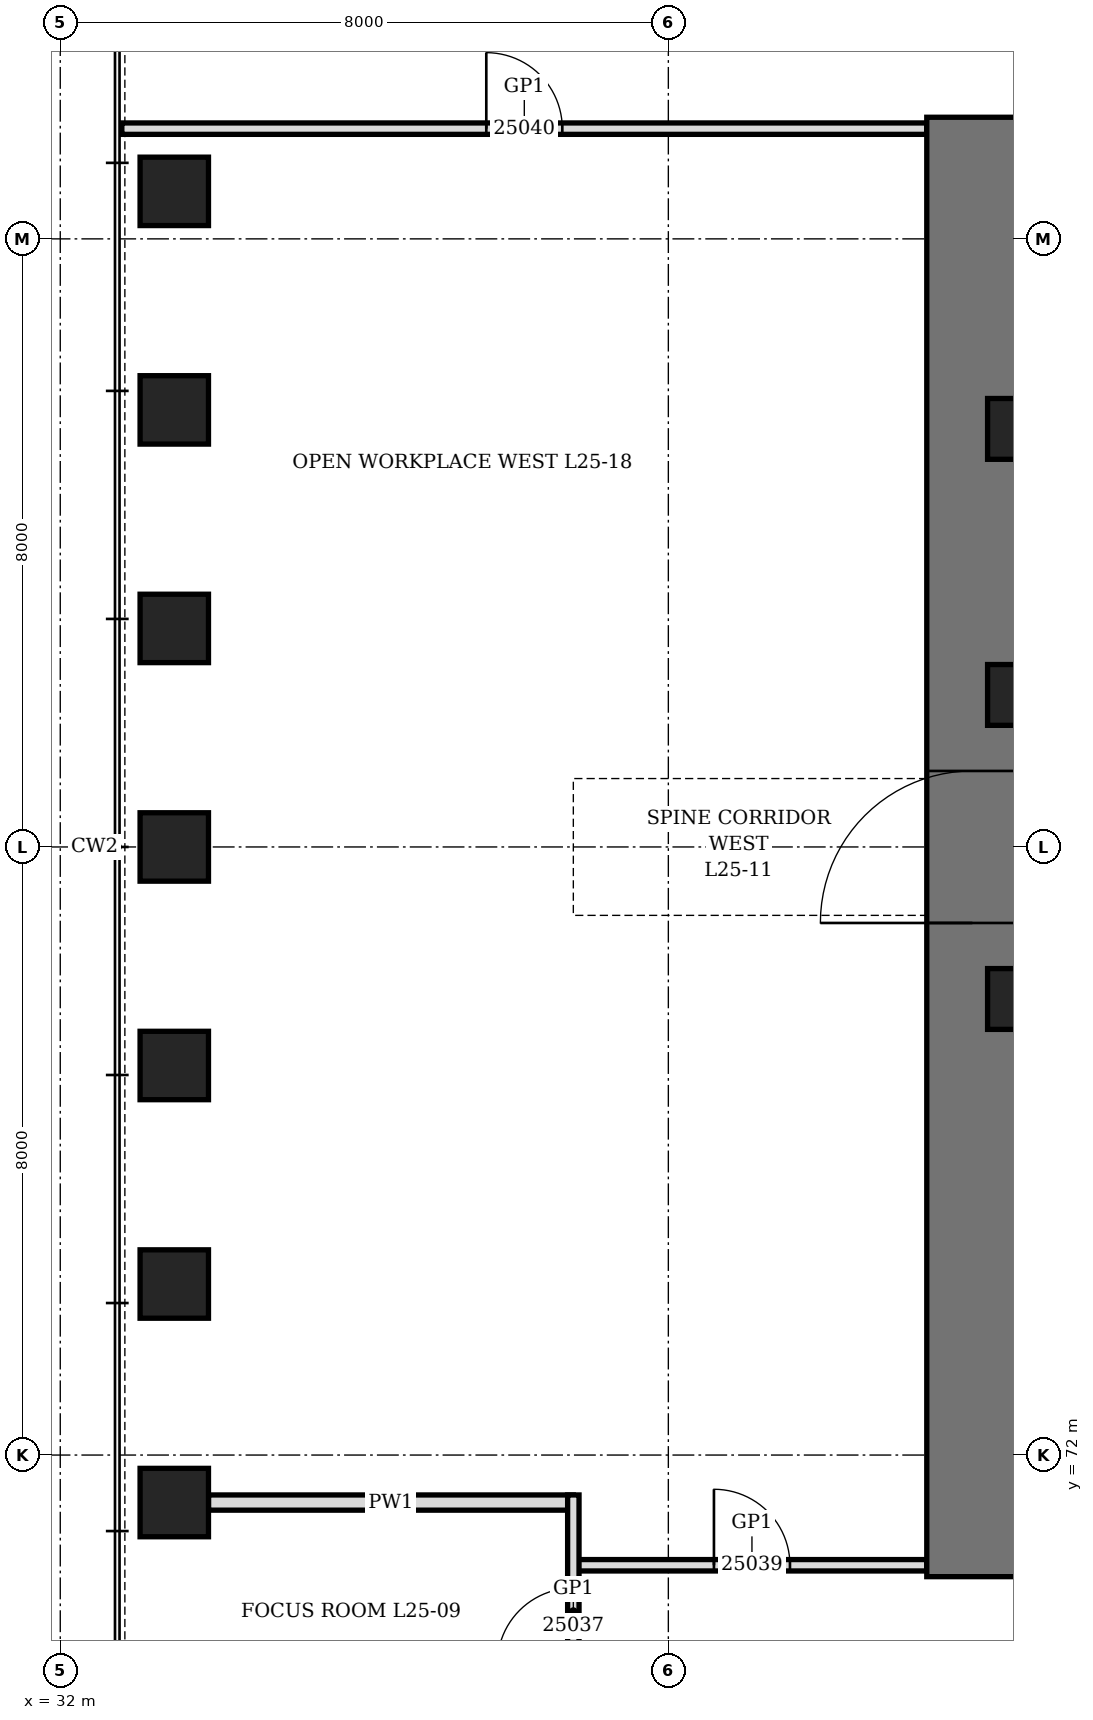
"""IFC4 building model, lengths in metres.
Left out: names, types, materials, properties, quantities, classifications, styles, units other than length and angle.
Written with IfcOpenShell. Run it as: python <this file> out.ifc"""

import sys

from ifc_helpers import new_model, si_unit, direction, frame, frame_2d, origin, origin_2d, place, context, subcontext, project, spatial, rectangle, hollow_rectangle, extrude, element, fill, save


model = new_model("IFC4")
c1 = context("Model", 3, precision=1e-05, world=origin(), true_north=direction((0.0, 1.0)))
c2 = subcontext(c1, "Body", "Model", "MODEL_VIEW")
j1 = project(units=[si_unit("LENGTHUNIT", "METRE"), si_unit("PLANEANGLEUNIT", "RADIAN")], contexts=[c1])
p1 = place(None, origin())
s1 = spatial("IfcSite", under=j1, at=p1, CompositionType="ELEMENT")
p2 = place(p1, origin())
s2 = spatial("IfcBuilding", under=s1, at=p2, CompositionType="ELEMENT")
p3 = place(p2, frame((0.0, 0.0, 116.5)))
s3 = spatial("IfcBuildingStorey", under=s2, at=p3, CompositionType="ELEMENT", Elevation=116.5)
for number, where, z_axis, x_axis in (
    (1, (33.5, 88.625, 0.0), (0.0, 0.0, 1.0), (0.0, 1.0, 0.0)),
    (2, (33.5, 85.75, 0.0), (0.0, 0.0, 1.0), (0.0, 1.0, 0.0)),
    (3, (33.5, 82.875, 0.0), (0.0, 0.0, 1.0), (0.0, 1.0, 0.0)),
    (4, (33.5, 80.0, 0.0), (0.0, 0.0, 1.0), (0.0, 1.0, 0.0)),
    (5, (33.5, 77.125, 0.0), (0.0, 0.0, 1.0), (0.0, 1.0, 0.0)),
    (6, (33.5, 74.25, 0.0), (0.0, 0.0, 1.0), (0.0, 1.0, 0.0)),
    (7, (33.5, 71.375, 0.0), (0.0, 0.0, 1.0), (0.0, 1.0, 0.0)),
):
    element("IfcColumn", number, at=place(p3, frame(where, z_axis=z_axis, x_axis=x_axis)), inside=s3, PredefinedType="COLUMN", context=c2, shape_type="SweptSolid", body=[
        extrude(hollow_rectangle(XDim=0.9, YDim=0.9, WallThickness=0.15, at=origin_2d()), origin(), (0.0, 0.0, 1.0), 4.2),
    ])
p4 = place(p3, frame((44.0, 70.4, 0.0), z_axis=(0.0, 0.0, 1.0), x_axis=(0.0, 1.0, 0.0)))
e8 = element("IfcWall", 8, at=p4, inside=s3, PredefinedType="SHEAR", context=c2, shape_type="SweptSolid", body=[
    extrude(rectangle(XDim=19.2, YDim=1.2, at=frame_2d((9.6, 0.0))), origin(), (0.0, 0.0, 1.0), 4.2),
])
p5 = place(p4, frame((8.6, 0.0, 0.0)))
e9 = element("IfcOpeningElement", 9, at=p5, cuts=e8, PredefinedType="OPENING", context=c2, shape_type="SweptSolid", body=[
    extrude(rectangle(XDim=2.0, YDim=2.4, at=frame_2d((1.0, 1.2))), frame((0.0, 0.61, 0.0), z_axis=(0.0, -1.0, 0.0), x_axis=(1.0, 0.0, 0.0)), (0.0, 0.0, 1.0), 1.22),
])
for number, where, z_axis, x_axis in (
    (10, (44.6, 78.0, 0.0), (0.0, 0.0, 1.0), (1.0, 0.0, 0.0)),
    (11, (44.6, 82.0, 0.0), (0.0, 0.0, 1.0), (1.0, 0.0, 0.0)),
    (12, (44.6, 85.5, 0.0), (0.0, 0.0, 1.0), (1.0, 0.0, 0.0)),
):
    element("IfcColumn", number, at=place(p3, frame(where, z_axis=z_axis, x_axis=x_axis)), inside=s3, PredefinedType="COLUMN", context=c2, shape_type="SweptSolid", body=[
        extrude(hollow_rectangle(XDim=0.8, YDim=0.8, WallThickness=0.1, at=origin_2d()), origin(), (0.0, 0.0, 1.0), 4.2),
    ])
p6 = place(p3, frame((33.95, 71.375, 0.0), z_axis=(0.0, 0.0, 1.0), x_axis=(1.0, 0.0, 0.0)))
e13 = element("IfcWall", 13, at=p6, inside=s3, PredefinedType="PARTITIONING", context=c2, shape_type="SweptSolid", body=[
    extrude(rectangle(XDim=4.8, YDim=0.2, at=frame_2d((2.4, 0.0))), origin(), (0.0, 0.0, 1.0), 3.428),
])
p7 = place(p3, frame((38.8, 70.55, 0.0), z_axis=(0.0, 0.0, 1.0), x_axis=(1.0, 0.0, 0.0)))
e14 = element("IfcWall", 14, at=p7, inside=s3, PredefinedType="PARTITIONING", context=c2, shape_type="SweptSolid", body=[
    extrude(rectangle(XDim=4.6, YDim=0.15, at=frame_2d((2.3, 0.0))), origin(), (0.0, 0.0, 1.0), 4.04),
])
p8 = place(p7, frame((1.8, 0.0, 0.0)))
e15 = element("IfcOpeningElement", 15, at=p8, cuts=e14, PredefinedType="OPENING", context=c2, shape_type="SweptSolid", body=[
    extrude(rectangle(XDim=1.0, YDim=2.4, at=frame_2d((0.5, 1.2))), frame((0.0, 0.085, 0.0), z_axis=(0.0, -1.0, 0.0), x_axis=(1.0, 0.0, 0.0)), (0.0, 0.0, 1.0), 0.17),
])
p9 = place(p3, frame((32.81, 89.45, 0.0), z_axis=(0.0, 0.0, 1.0), x_axis=(1.0, 0.0, 0.0)))
e16 = element("IfcWall", 16, at=p9, inside=s3, PredefinedType="PARTITIONING", context=c2, shape_type="SweptSolid", body=[
    extrude(rectangle(XDim=10.59, YDim=0.15, at=frame_2d((5.295, 0.0))), origin(), (0.0, 0.0, 1.0), 4.04),
])
p10 = place(p9, frame((4.795, 0.0, 0.0)))
e17 = element("IfcOpeningElement", 17, at=p10, cuts=e16, PredefinedType="OPENING", context=c2, shape_type="SweptSolid", body=[
    extrude(rectangle(XDim=1.0, YDim=2.4, at=frame_2d((0.5, 1.2))), frame((0.0, 0.085, 0.0), z_axis=(0.0, -1.0, 0.0), x_axis=(1.0, 0.0, 0.0)), (0.0, 0.0, 1.0), 0.17),
])
p11 = place(p3, frame((38.75, 68.4, 0.0), z_axis=(0.0, 0.0, 1.0), x_axis=(0.0, 1.0, 0.0)))
e18 = element("IfcWall", 18, at=p11, inside=s3, PredefinedType="PARTITIONING", context=c2, shape_type="SweptSolid", body=[
    extrude(rectangle(XDim=3.075, YDim=0.15, at=frame_2d((1.538, 0.0))), origin(), (0.0, 0.0, 1.0), 4.04),
])
p12 = place(p11, frame((0.85, 0.0, 0.0)))
e19 = element("IfcOpeningElement", 19, at=p12, cuts=e18, PredefinedType="OPENING", context=c2, shape_type="SweptSolid", body=[
    extrude(rectangle(XDim=1.0, YDim=2.4, at=frame_2d((0.5, 1.2))), frame((0.0, 0.085, 0.0), z_axis=(0.0, -1.0, 0.0), x_axis=(1.0, 0.0, 0.0)), (0.0, 0.0, 1.0), 0.17),
])
p13 = place(p5, origin())
e20 = element("IfcDoor", 20, at=p13, inside=s3, OperationType="DOUBLE_DOOR_SINGLE_SWING", PredefinedType="DOOR", context=c2, shape_type="SweptSolid", body=[
    extrude(rectangle(XDim=2.0, YDim=2.4, at=frame_2d((1.0, 1.2))), frame((0.0, 0.35, 0.0), z_axis=(0.0, -1.0, 0.0), x_axis=(1.0, 0.0, 0.0)), (0.0, 0.0, 1.0), 0.7),
])
fill(e9, e20)
p14 = place(p12, origin())
e21 = element("IfcDoor", 21, at=p14, inside=s3, OperationType="SINGLE_SWING_RIGHT", PredefinedType="DOOR", context=c2, shape_type="SweptSolid", body=[
    extrude(rectangle(XDim=1.0, YDim=2.4, at=frame_2d((0.5, 1.2))), frame((0.0, 0.075, 0.0), z_axis=(0.0, -1.0, 0.0), x_axis=(1.0, 0.0, 0.0)), (0.0, 0.0, 1.0), 0.149),
])
fill(e19, e21)
p15 = place(p8, origin())
e22 = element("IfcDoor", 22, at=p15, inside=s3, OperationType="SINGLE_SWING_RIGHT", PredefinedType="DOOR", context=c2, shape_type="SweptSolid", body=[
    extrude(rectangle(XDim=1.0, YDim=2.4, at=frame_2d((0.5, 1.2))), frame((0.0, 0.075, 0.0), z_axis=(0.0, -1.0, 0.0), x_axis=(1.0, 0.0, 0.0)), (0.0, 0.0, 1.0), 0.149),
])
fill(e15, e22)
p16 = place(p10, origin())
e23 = element("IfcDoor", 23, at=p16, inside=s3, OperationType="SINGLE_SWING_RIGHT", PredefinedType="DOOR", context=c2, shape_type="SweptSolid", body=[
    extrude(rectangle(XDim=1.0, YDim=2.4, at=frame_2d((0.5, 1.2))), frame((0.0, 0.075, 0.0), z_axis=(0.0, -1.0, 0.0), x_axis=(1.0, 0.0, 0.0)), (0.0, 0.0, 1.0), 0.149),
])
fill(e17, e23)
save(model, sys.argv[1])
